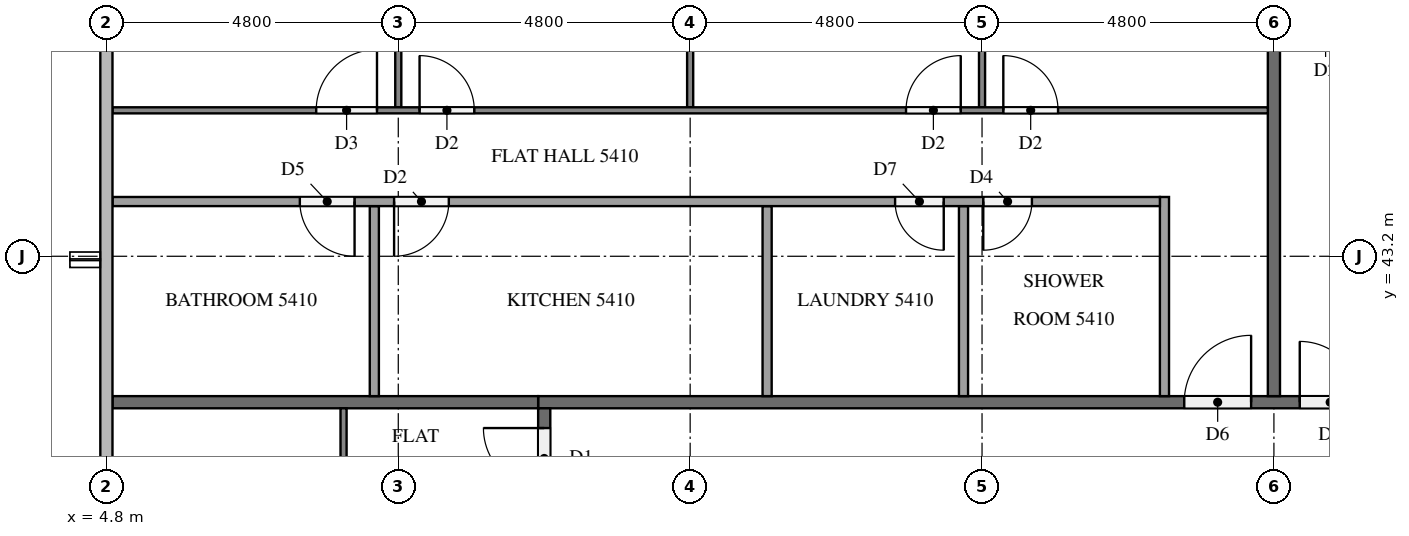
"""IFC4 building model, lengths in metres.
Left out: names, types, materials, properties, quantities, classifications, styles, units other than length and angle.
Written with IfcOpenShell. Run it as: python <this file> out.ifc"""

import sys

from ifc_helpers import new_model, si_unit, direction, frame, frame_2d, origin, place, context, subcontext, project, spatial, rectangle, extrude, element, fill, save


model = new_model("IFC4")
c1 = context("Model", 3, precision=1e-05, world=origin(), true_north=direction((0.0, 1.0)))
c2 = subcontext(c1, "Body", "Model", "MODEL_VIEW")
j1 = project(units=[si_unit("LENGTHUNIT", "METRE"), si_unit("PLANEANGLEUNIT", "RADIAN")], contexts=[c1])
p1 = place(None, origin())
s1 = spatial("IfcSite", under=j1, at=p1, CompositionType="ELEMENT")
p2 = place(p1, origin())
s2 = spatial("IfcBuilding", under=s1, at=p2, CompositionType="ELEMENT")
p3 = place(p2, frame((0.0, 0.0, 208.8)))
s3 = spatial("IfcBuildingStorey", under=s2, at=p3, CompositionType="ELEMENT", Elevation=208.8)
p4 = place(p3, frame((11.9, 40.8, 0.0), z_axis=(0.0, 0.0, 1.0), x_axis=(1.0, 0.0, 0.0)))
e1 = element("IfcWall", 1, at=p4, inside=s3, PredefinedType="PARTITIONING", context=c2, shape_type="SweptSolid", body=[
    extrude(rectangle(XDim=38.6, YDim=0.2, at=frame_2d((19.3, 0.0))), origin(), (0.0, 0.0, 1.0), 3.2),
])
p5 = place(p4, frame((36.525, 0.0, 0.0)))
e2 = element("IfcOpeningElement", 2, at=p5, cuts=e1, PredefinedType="OPENING", context=c2, shape_type="SweptSolid", body=[
    extrude(rectangle(XDim=1.0, YDim=2.1, at=frame_2d((0.5, 1.05))), frame((0.0, 0.11, 0.0), z_axis=(0.0, -1.0, 0.0), x_axis=(1.0, 0.0, 0.0)), (0.0, 0.0, 1.0), 0.22),
])
p6 = place(p4, frame((29.325, 0.0, 0.0)))
e3 = element("IfcOpeningElement", 3, at=p6, cuts=e1, PredefinedType="OPENING", context=c2, shape_type="SweptSolid", body=[
    extrude(rectangle(XDim=1.0, YDim=2.1, at=frame_2d((0.5, 1.05))), frame((0.0, 0.11, 0.0), z_axis=(0.0, -1.0, 0.0), x_axis=(1.0, 0.0, 0.0)), (0.0, 0.0, 1.0), 0.22),
])
p7 = place(p4, frame((12.525, 0.0, 0.0)))
e4 = element("IfcOpeningElement", 4, at=p7, cuts=e1, PredefinedType="OPENING", context=c2, shape_type="SweptSolid", body=[
    extrude(rectangle(XDim=1.0, YDim=2.1, at=frame_2d((0.5, 1.05))), frame((0.0, 0.11, 0.0), z_axis=(0.0, -1.0, 0.0), x_axis=(1.0, 0.0, 0.0)), (0.0, 0.0, 1.0), 0.22),
])
p8 = place(p4, frame((10.625, 0.0, 0.0)))
e5 = element("IfcOpeningElement", 5, at=p8, cuts=e1, PredefinedType="OPENING", context=c2, shape_type="SweptSolid", body=[
    extrude(rectangle(XDim=1.1, YDim=2.1, at=frame_2d((0.55, 1.05))), frame((0.0, 0.11, 0.0), z_axis=(0.0, -1.0, 0.0), x_axis=(1.0, 0.0, 0.0)), (0.0, 0.0, 1.0), 0.22),
])
p9 = place(p3, frame((12.0, 12.1, 0.0), z_axis=(0.0, 0.0, 1.0), x_axis=(0.0, 1.0, 0.0)))
e6 = element("IfcWall", 6, at=p9, inside=s3, PredefinedType="PARTITIONING", context=c2, shape_type="SweptSolid", body=[
    extrude(rectangle(XDim=28.6, YDim=0.2, at=frame_2d((14.3, 0.0))), origin(), (0.0, 0.0, 1.0), 3.2),
])
p10 = place(p9, frame((27.275, 0.0, 0.0)))
e7 = element("IfcOpeningElement", 7, at=p10, cuts=e6, PredefinedType="OPENING", context=c2, shape_type="SweptSolid", body=[
    extrude(rectangle(XDim=1.0, YDim=2.1, at=frame_2d((0.5, 1.05))), frame((0.0, 0.11, 0.0), z_axis=(0.0, -1.0, 0.0), x_axis=(1.0, 0.0, 0.0)), (0.0, 0.0, 1.0), 0.22),
])
p11 = place(p9, frame((12.325, 0.0, 0.0)))
e8 = element("IfcOpeningElement", 8, at=p11, cuts=e6, PredefinedType="OPENING", context=c2, shape_type="SweptSolid", body=[
    extrude(rectangle(XDim=1.0, YDim=2.1, at=frame_2d((0.5, 1.05))), frame((0.0, 0.11, 0.0), z_axis=(0.0, -1.0, 0.0), x_axis=(1.0, 0.0, 0.0)), (0.0, 0.0, 1.0), 0.22),
])
p12 = place(p9, frame((2.725, 0.0, 0.0)))
e9 = element("IfcOpeningElement", 9, at=p12, cuts=e6, PredefinedType="OPENING", context=c2, shape_type="SweptSolid", body=[
    extrude(rectangle(XDim=1.0, YDim=2.1, at=frame_2d((0.5, 1.05))), frame((0.0, 0.11, 0.0), z_axis=(0.0, -1.0, 0.0), x_axis=(1.0, 0.0, 0.0)), (0.0, 0.0, 1.0), 0.22),
])
p13 = place(p9, frame((0.875, 0.0, 0.0)))
e10 = element("IfcOpeningElement", 10, at=p13, cuts=e6, PredefinedType="OPENING", context=c2, shape_type="SweptSolid", body=[
    extrude(rectangle(XDim=1.0, YDim=2.1, at=frame_2d((0.5, 1.05))), frame((0.0, 0.11, 0.0), z_axis=(0.0, -1.0, 0.0), x_axis=(1.0, 0.0, 0.0)), (0.0, 0.0, 1.0), 0.22),
])
p14 = place(p3, frame((24.0, 52.7, 0.0), z_axis=(0.0, 0.0, 1.0), x_axis=(0.0, -1.0, 0.0)))
e11 = element("IfcWall", 11, at=p14, inside=s3, PredefinedType="PARTITIONING", context=c2, shape_type="SweptSolid", body=[
    extrude(rectangle(XDim=11.8, YDim=0.2, at=frame_2d((5.9, 0.0))), origin(), (0.0, 0.0, 1.0), 3.2),
])
p15 = place(p3, frame((4.9, 40.8, 0.0), z_axis=(0.0, 0.0, 1.0), x_axis=(1.0, 0.0, 0.0)))
e12 = element("IfcWall", 12, at=p15, inside=s3, PredefinedType="PARTITIONING", context=c2, shape_type="SweptSolid", body=[
    extrude(rectangle(XDim=7.0, YDim=0.2, at=frame_2d((3.5, 0.0))), origin(), (0.0, 0.0, 1.0), 3.2),
])
p16 = place(p3, frame((19.2, 45.65, 0.0), z_axis=(0.0, 0.0, 1.0), x_axis=(0.0, 1.0, 0.0)))
e13 = element("IfcWall", 13, at=p16, inside=s3, PredefinedType="PARTITIONING", context=c2, shape_type="SweptSolid", body=[
    extrude(rectangle(XDim=6.825, YDim=0.1, at=frame_2d((3.413, 0.0))), origin(), (0.0, 0.0, 1.0), 3.2),
])
p17 = place(p3, frame((14.4, 45.65, 0.0), z_axis=(0.0, 0.0, 1.0), x_axis=(0.0, 1.0, 0.0)))
e14 = element("IfcWall", 14, at=p17, inside=s3, PredefinedType="PARTITIONING", context=c2, shape_type="SweptSolid", body=[
    extrude(rectangle(XDim=7.05, YDim=0.1, at=frame_2d((3.525, 0.0))), origin(), (0.0, 0.0, 1.0), 3.2),
])
p18 = place(p3, frame((9.6, 45.65, 0.0), z_axis=(0.0, 0.0, 1.0), x_axis=(0.0, 1.0, 0.0)))
e15 = element("IfcWall", 15, at=p18, inside=s3, PredefinedType="PARTITIONING", context=c2, shape_type="SweptSolid", body=[
    extrude(rectangle(XDim=6.675, YDim=0.1, at=frame_2d((3.337, 0.0))), origin(), (0.0, 0.0, 1.0), 3.2),
])
p19 = place(p3, frame((4.9, 45.6, 0.0), z_axis=(0.0, 0.0, 1.0), x_axis=(1.0, 0.0, 0.0)))
e16 = element("IfcWall", 16, at=p19, inside=s3, PredefinedType="PARTITIONING", context=c2, shape_type="SweptSolid", body=[
    extrude(rectangle(XDim=19.0, YDim=0.1, at=frame_2d((9.5, 0.0))), origin(), (0.0, 0.0, 1.0), 3.2),
])
p20 = place(p19, frame((14.65, 0.0, 0.0)))
e17 = element("IfcOpeningElement", 17, at=p20, cuts=e16, PredefinedType="OPENING", context=c2, shape_type="SweptSolid", body=[
    extrude(rectangle(XDim=0.9, YDim=2.1, at=frame_2d((0.45, 1.05))), frame((0.0, 0.06, 0.0), z_axis=(0.0, -1.0, 0.0), x_axis=(1.0, 0.0, 0.0)), (0.0, 0.0, 1.0), 0.12),
])
p21 = place(p19, frame((13.05, 0.0, 0.0)))
e18 = element("IfcOpeningElement", 18, at=p21, cuts=e16, PredefinedType="OPENING", context=c2, shape_type="SweptSolid", body=[
    extrude(rectangle(XDim=0.9, YDim=2.1, at=frame_2d((0.45, 1.05))), frame((0.0, 0.06, 0.0), z_axis=(0.0, -1.0, 0.0), x_axis=(1.0, 0.0, 0.0)), (0.0, 0.0, 1.0), 0.12),
])
p22 = place(p19, frame((5.05, 0.0, 0.0)))
e19 = element("IfcOpeningElement", 19, at=p22, cuts=e16, PredefinedType="OPENING", context=c2, shape_type="SweptSolid", body=[
    extrude(rectangle(XDim=0.9, YDim=2.1, at=frame_2d((0.45, 1.05))), frame((0.0, 0.06, 0.0), z_axis=(0.0, -1.0, 0.0), x_axis=(1.0, 0.0, 0.0)), (0.0, 0.0, 1.0), 0.12),
])
p23 = place(p19, frame((3.35, 0.0, 0.0)))
e20 = element("IfcOpeningElement", 20, at=p23, cuts=e16, PredefinedType="OPENING", context=c2, shape_type="SweptSolid", body=[
    extrude(rectangle(XDim=1.0, YDim=2.1, at=frame_2d((0.5, 1.05))), frame((0.0, 0.06, 0.0), z_axis=(0.0, -1.0, 0.0), x_axis=(1.0, 0.0, 0.0)), (0.0, 0.0, 1.0), 0.12),
])
for number, where, z_axis, x_axis in (
    (21, (18.895, 40.9, 0.0), (0.0, 0.0, 1.0), (0.0, 1.0, 0.0)),
    (22, (15.666, 40.9, 0.0), (0.0, 0.0, 1.0), (0.0, 1.0, 0.0)),
    (23, (9.206, 40.9, 0.0), (0.0, 0.0, 1.0), (0.0, 1.0, 0.0)),
):
    element("IfcWall", number, at=place(p3, frame(where, z_axis=z_axis, x_axis=x_axis)), inside=s3, PredefinedType="PARTITIONING", context=c2, shape_type="SweptSolid", body=[
        extrude(rectangle(XDim=3.125, YDim=0.15, at=frame_2d((1.562, 0.0))), origin(), (0.0, 0.0, 1.0), 3.2),
    ])
p24 = place(p3, frame((22.2, 40.9, 0.0), z_axis=(0.0, 0.0, 1.0), x_axis=(0.0, 1.0, 0.0)))
e24 = element("IfcWall", 24, at=p24, inside=s3, PredefinedType="PARTITIONING", context=c2, shape_type="SweptSolid", body=[
    extrude(rectangle(XDim=3.275, YDim=0.15, at=frame_2d((1.638, 0.0))), origin(), (0.0, 0.0, 1.0), 3.2),
])
p25 = place(p3, frame((22.125, 44.1, 0.0), z_axis=(0.0, 0.0, 1.0), x_axis=(-1.0, 0.0, 0.0)))
e25 = element("IfcWall", 25, at=p25, inside=s3, PredefinedType="PARTITIONING", context=c2, shape_type="SweptSolid", body=[
    extrude(rectangle(XDim=17.225, YDim=0.15, at=frame_2d((8.613, 0.0))), origin(), (0.0, 0.0, 1.0), 3.2),
])
p26 = place(p25, frame((2.105, 0.0, 0.0)))
e26 = element("IfcOpeningElement", 26, at=p26, cuts=e25, PredefinedType="OPENING", context=c2, shape_type="SweptSolid", body=[
    extrude(rectangle(XDim=0.8, YDim=2.1, at=frame_2d((0.4, 1.05))), frame((0.0, 0.085, 0.0), z_axis=(0.0, -1.0, 0.0), x_axis=(1.0, 0.0, 0.0)), (0.0, 0.0, 1.0), 0.17),
])
p27 = place(p25, frame((3.555, 0.0, 0.0)))
e27 = element("IfcOpeningElement", 27, at=p27, cuts=e25, PredefinedType="OPENING", context=c2, shape_type="SweptSolid", body=[
    extrude(rectangle(XDim=0.8, YDim=2.1, at=frame_2d((0.4, 1.05))), frame((0.0, 0.085, 0.0), z_axis=(0.0, -1.0, 0.0), x_axis=(1.0, 0.0, 0.0)), (0.0, 0.0, 1.0), 0.17),
])
p28 = place(p25, frame((11.694, 0.0, 0.0)))
e28 = element("IfcOpeningElement", 28, at=p28, cuts=e25, PredefinedType="OPENING", context=c2, shape_type="SweptSolid", body=[
    extrude(rectangle(XDim=0.9, YDim=2.1, at=frame_2d((0.45, 1.05))), frame((0.0, 0.085, 0.0), z_axis=(0.0, -1.0, 0.0), x_axis=(1.0, 0.0, 0.0)), (0.0, 0.0, 1.0), 0.17),
])
p29 = place(p25, frame((13.244, 0.0, 0.0)))
e29 = element("IfcOpeningElement", 29, at=p29, cuts=e25, PredefinedType="OPENING", context=c2, shape_type="SweptSolid", body=[
    extrude(rectangle(XDim=0.9, YDim=2.1, at=frame_2d((0.45, 1.05))), frame((0.0, 0.085, 0.0), z_axis=(0.0, -1.0, 0.0), x_axis=(1.0, 0.0, 0.0)), (0.0, 0.0, 1.0), 0.17),
])
p30 = place(p3, frame((8.7, 33.7, 0.0), z_axis=(0.0, 0.0, 1.0), x_axis=(0.0, 1.0, 0.0)))
e30 = element("IfcWall", 30, at=p30, inside=s3, PredefinedType="PARTITIONING", context=c2, shape_type="SweptSolid", body=[
    extrude(rectangle(XDim=7.0, YDim=0.1, at=frame_2d((3.5, 0.0))), origin(), (0.0, 0.0, 1.0), 3.2),
])
p31 = place(p30, frame((0.3, 0.0, 0.0)))
e31 = element("IfcOpeningElement", 31, at=p31, cuts=e30, PredefinedType="OPENING", context=c2, shape_type="SweptSolid", body=[
    extrude(rectangle(XDim=1.0, YDim=2.1, at=frame_2d((0.5, 1.05))), frame((0.0, 0.06, 0.0), z_axis=(0.0, -1.0, 0.0), x_axis=(1.0, 0.0, 0.0)), (0.0, 0.0, 1.0), 0.12),
])
p32 = place(p7, origin())
e32 = element("IfcDoor", 32, at=p32, inside=s3, OperationType="SINGLE_SWING_LEFT", PredefinedType="DOOR", context=c2, shape_type="SweptSolid", body=[
    extrude(rectangle(XDim=1.0, YDim=2.1, at=frame_2d((0.5, 1.05))), frame((0.0, 0.025, 0.0), z_axis=(0.0, -1.0, 0.0), x_axis=(1.0, 0.0, 0.0)), (0.0, 0.0, 1.0), 0.05),
])
fill(e4, e32)
p33 = place(p8, origin())
e33 = element("IfcDoor", 33, at=p33, inside=s3, OperationType="SINGLE_SWING_RIGHT", PredefinedType="DOOR", context=c2, shape_type="SweptSolid", body=[
    extrude(rectangle(XDim=1.1, YDim=2.1, at=frame_2d((0.55, 1.05))), frame((0.0, 0.025, 0.0), z_axis=(0.0, -1.0, 0.0), x_axis=(1.0, 0.0, 0.0)), (0.0, 0.0, 1.0), 0.05),
])
fill(e5, e33)
p34 = place(p10, origin())
e34 = element("IfcDoor", 34, at=p34, inside=s3, OperationType="SINGLE_SWING_RIGHT", PredefinedType="DOOR", context=c2, shape_type="SweptSolid", body=[
    extrude(rectangle(XDim=1.0, YDim=2.1, at=frame_2d((0.5, 1.05))), frame((0.0, 0.025, 0.0), z_axis=(0.0, -1.0, 0.0), x_axis=(1.0, 0.0, 0.0)), (0.0, 0.0, 1.0), 0.05),
])
fill(e7, e34)
p35 = place(p20, origin())
e35 = element("IfcDoor", 35, at=p35, inside=s3, OperationType="SINGLE_SWING_LEFT", PredefinedType="DOOR", context=c2, shape_type="SweptSolid", body=[
    extrude(rectangle(XDim=0.9, YDim=2.1, at=frame_2d((0.45, 1.05))), frame((0.0, 0.025, 0.0), z_axis=(0.0, -1.0, 0.0), x_axis=(1.0, 0.0, 0.0)), (0.0, 0.0, 1.0), 0.05),
])
fill(e17, e35)
p36 = place(p21, origin())
e36 = element("IfcDoor", 36, at=p36, inside=s3, OperationType="SINGLE_SWING_RIGHT", PredefinedType="DOOR", context=c2, shape_type="SweptSolid", body=[
    extrude(rectangle(XDim=0.9, YDim=2.1, at=frame_2d((0.45, 1.05))), frame((0.0, 0.025, 0.0), z_axis=(0.0, -1.0, 0.0), x_axis=(1.0, 0.0, 0.0)), (0.0, 0.0, 1.0), 0.05),
])
fill(e18, e36)
p37 = place(p22, origin())
e37 = element("IfcDoor", 37, at=p37, inside=s3, OperationType="SINGLE_SWING_LEFT", PredefinedType="DOOR", context=c2, shape_type="SweptSolid", body=[
    extrude(rectangle(XDim=0.9, YDim=2.1, at=frame_2d((0.45, 1.05))), frame((0.0, 0.025, 0.0), z_axis=(0.0, -1.0, 0.0), x_axis=(1.0, 0.0, 0.0)), (0.0, 0.0, 1.0), 0.05),
])
fill(e19, e37)
p38 = place(p23, origin())
e38 = element("IfcDoor", 38, at=p38, inside=s3, OperationType="SINGLE_SWING_RIGHT", PredefinedType="DOOR", context=c2, shape_type="SweptSolid", body=[
    extrude(rectangle(XDim=1.0, YDim=2.1, at=frame_2d((0.5, 1.05))), frame((0.0, 0.025, 0.0), z_axis=(0.0, -1.0, 0.0), x_axis=(1.0, 0.0, 0.0)), (0.0, 0.0, 1.0), 0.05),
])
fill(e20, e38)
p39 = place(p26, origin())
e39 = element("IfcDoor", 39, at=p39, inside=s3, OperationType="SINGLE_SWING_RIGHT", PredefinedType="DOOR", context=c2, shape_type="SweptSolid", body=[
    extrude(rectangle(XDim=0.8, YDim=2.1, at=frame_2d((0.4, 1.05))), frame((0.0, 0.025, 0.0), z_axis=(0.0, -1.0, 0.0), x_axis=(1.0, 0.0, 0.0)), (0.0, 0.0, 1.0), 0.05),
])
fill(e26, e39)
p40 = place(p27, origin())
e40 = element("IfcDoor", 40, at=p40, inside=s3, OperationType="SINGLE_SWING_LEFT", PredefinedType="DOOR", context=c2, shape_type="SweptSolid", body=[
    extrude(rectangle(XDim=0.8, YDim=2.1, at=frame_2d((0.4, 1.05))), frame((0.0, 0.025, 0.0), z_axis=(0.0, -1.0, 0.0), x_axis=(1.0, 0.0, 0.0)), (0.0, 0.0, 1.0), 0.05),
])
fill(e27, e40)
p41 = place(p28, origin())
e41 = element("IfcDoor", 41, at=p41, inside=s3, OperationType="SINGLE_SWING_RIGHT", PredefinedType="DOOR", context=c2, shape_type="SweptSolid", body=[
    extrude(rectangle(XDim=0.9, YDim=2.1, at=frame_2d((0.45, 1.05))), frame((0.0, 0.025, 0.0), z_axis=(0.0, -1.0, 0.0), x_axis=(1.0, 0.0, 0.0)), (0.0, 0.0, 1.0), 0.05),
])
fill(e28, e41)
p42 = place(p29, origin())
e42 = element("IfcDoor", 42, at=p42, inside=s3, OperationType="SINGLE_SWING_LEFT", PredefinedType="DOOR", context=c2, shape_type="SweptSolid", body=[
    extrude(rectangle(XDim=0.9, YDim=2.1, at=frame_2d((0.45, 1.05))), frame((0.0, 0.025, 0.0), z_axis=(0.0, -1.0, 0.0), x_axis=(1.0, 0.0, 0.0)), (0.0, 0.0, 1.0), 0.05),
])
fill(e29, e42)
save(model, sys.argv[1])
